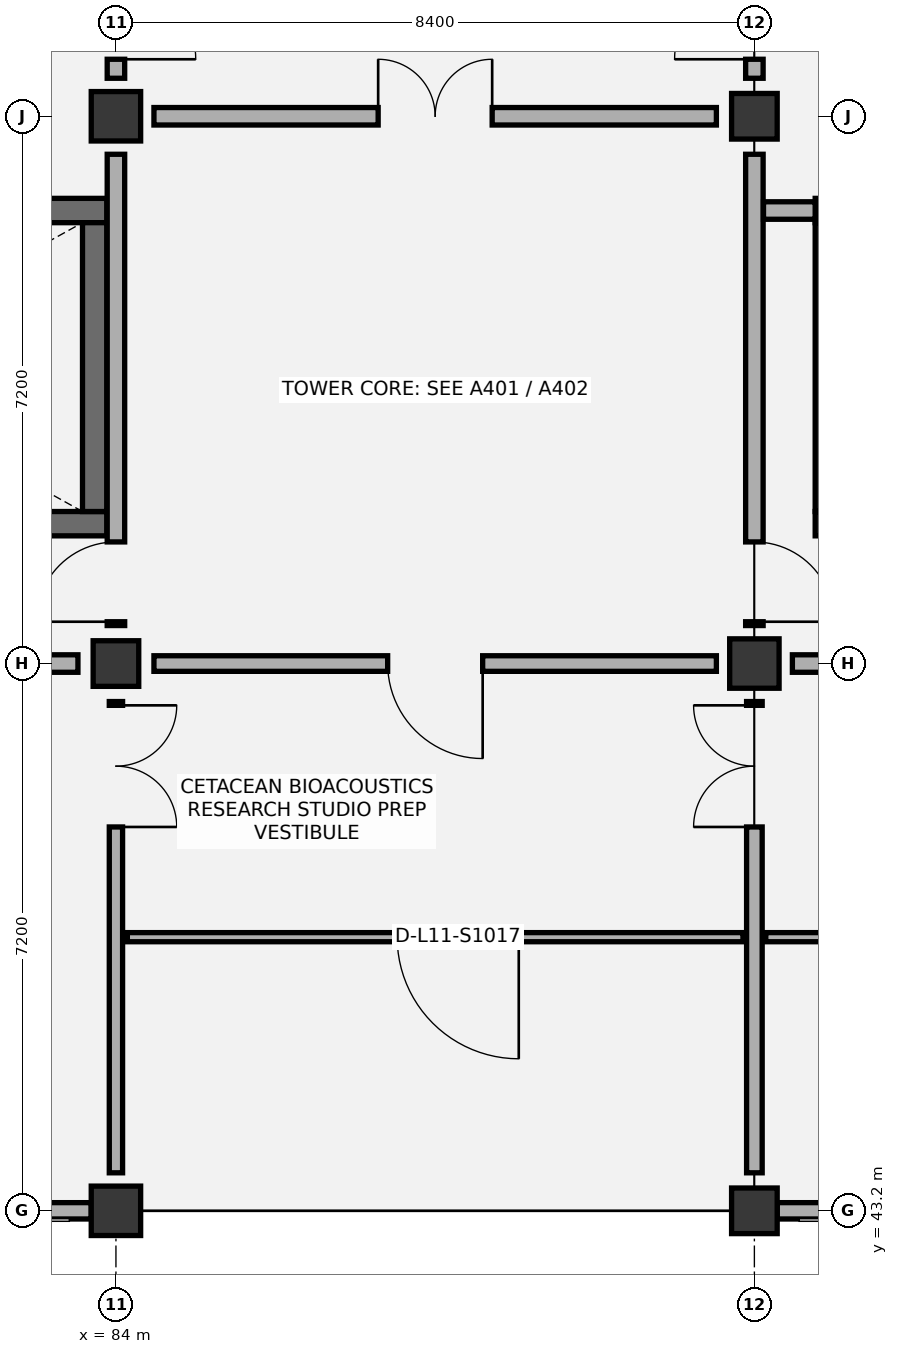
"""IFC4 building model, lengths in metres.
Left out: names, types, materials, properties, quantities, classifications, styles, units other than length and angle.
Written with IfcOpenShell. Run it as: python <this file> out.ifc"""

import sys

from ifc_helpers import new_model, si_unit, direction, frame, frame_2d, origin, origin_2d, place, context, subcontext, project, spatial, rectangle, extrude, element, fill, save


model = new_model("IFC4")
c1 = context("Model", 3, precision=1e-05, world=origin(), true_north=direction((0.0, 1.0)))
c2 = subcontext(c1, "Body", "Model", "MODEL_VIEW")
j1 = project(units=[si_unit("LENGTHUNIT", "METRE"), si_unit("PLANEANGLEUNIT", "RADIAN")], contexts=[c1])
p1 = place(None, origin())
s1 = spatial("IfcSite", under=j1, at=p1, CompositionType="ELEMENT")
p2 = place(p1, origin())
s2 = spatial("IfcBuilding", under=s1, at=p2, CompositionType="ELEMENT")
p3 = place(p2, frame((0.0, 0.0, 52.2)))
s3 = spatial("IfcBuildingStorey", under=s2, at=p3, CompositionType="ELEMENT", Elevation=52.2)
p4 = place(p3, frame((84.0, 43.2, 0.0), z_axis=(0.0, 0.0, 1.0), x_axis=(1.0, 0.0, 0.0)))
e1 = element("IfcColumn", 1, at=p4, inside=s3, PredefinedType="COLUMN", context=c2, shape_type="SweptSolid", body=[
    extrude(rectangle(XDim=0.65, YDim=0.65, at=origin_2d()), origin(), (0.0, 0.0, 1.0), 4.2),
])
p5 = place(p3, frame((84.0, 50.4, 0.0), z_axis=(0.0, 0.0, 1.0), x_axis=(1.0, 0.0, 0.0)))
e2 = element("IfcColumn", 2, at=p5, inside=s3, PredefinedType="COLUMN", context=c2, shape_type="SweptSolid", body=[
    extrude(rectangle(XDim=0.6, YDim=0.6, at=origin_2d()), origin(), (0.0, 0.0, 1.0), 4.2),
])
p6 = place(p3, frame((84.0, 57.6, 0.0), z_axis=(0.0, 0.0, 1.0), x_axis=(1.0, 0.0, 0.0)))
e3 = element("IfcColumn", 3, at=p6, inside=s3, PredefinedType="COLUMN", context=c2, shape_type="SweptSolid", body=[
    extrude(rectangle(XDim=0.65, YDim=0.65, at=origin_2d()), origin(), (0.0, 0.0, 1.0), 4.2),
])
p7 = place(p3, frame((92.4, 43.2, 0.0), z_axis=(0.0, 0.0, 1.0), x_axis=(1.0, 0.0, 0.0)))
e4 = element("IfcColumn", 4, at=p7, inside=s3, PredefinedType="COLUMN", context=c2, shape_type="SweptSolid", body=[
    extrude(rectangle(XDim=0.6, YDim=0.6, at=origin_2d()), origin(), (0.0, 0.0, 1.0), 4.2),
])
p8 = place(p3, frame((92.4, 50.4, 0.0), z_axis=(0.0, 0.0, 1.0), x_axis=(1.0, 0.0, 0.0)))
e5 = element("IfcColumn", 5, at=p8, inside=s3, PredefinedType="COLUMN", context=c2, shape_type="SweptSolid", body=[
    extrude(rectangle(XDim=0.65, YDim=0.65, at=origin_2d()), origin(), (0.0, 0.0, 1.0), 4.2),
])
p9 = place(p3, frame((92.4, 57.6, 0.0), z_axis=(0.0, 0.0, 1.0), x_axis=(1.0, 0.0, 0.0)))
e6 = element("IfcColumn", 6, at=p9, inside=s3, PredefinedType="COLUMN", context=c2, shape_type="SweptSolid", body=[
    extrude(rectangle(XDim=0.6, YDim=0.6, at=origin_2d()), origin(), (0.0, 0.0, 1.0), 4.2),
])
p10 = place(p3, frame((76.4, 52.24, 0.0), z_axis=(0.0, 0.0, 1.0), x_axis=(1.0, 0.0, 0.0)))
e7 = element("IfcWall", 7, at=p10, inside=s3, PredefinedType="SHEAR", context=c2, shape_type="SweptSolid", body=[
    extrude(rectangle(XDim=7.48, YDim=0.32, at=frame_2d((3.74, 0.0))), origin(), (0.0, 0.0, 1.0), 3.92),
])
p11 = place(p10, frame((0.45, 0.0, 0.0)))
e8 = element("IfcOpeningElement", 8, at=p11, cuts=e7, PredefinedType="OPENING", context=c2, shape_type="SweptSolid", body=[
    extrude(rectangle(XDim=1.05, YDim=2.15, at=frame_2d((0.525, 1.075))), frame((0.0, 0.17, 0.0), z_axis=(0.0, -1.0, 0.0), x_axis=(1.0, 0.0, 0.0)), (0.0, 0.0, 1.0), 0.34),
])
p12 = place(p3, frame((76.4, 56.36, 0.0), z_axis=(0.0, 0.0, 1.0), x_axis=(1.0, 0.0, 0.0)))
e9 = element("IfcWall", 9, at=p12, inside=s3, PredefinedType="SHEAR", context=c2, shape_type="SweptSolid", body=[
    extrude(rectangle(XDim=7.48, YDim=0.32, at=frame_2d((3.74, 0.0))), origin(), (0.0, 0.0, 1.0), 3.92),
])
p13 = place(p3, frame((83.72, 52.4, 0.0), z_axis=(0.0, 0.0, 1.0), x_axis=(0.0, 1.0, 0.0)))
e10 = element("IfcWall", 10, at=p13, inside=s3, PredefinedType="SHEAR", context=c2, shape_type="SweptSolid", body=[
    extrude(rectangle(XDim=3.8, YDim=0.32, at=frame_2d((1.9, 0.0))), origin(), (0.0, 0.0, 1.0), 3.92),
])
p14 = place(p3, frame((93.2, 52.24, 0.0), z_axis=(0.0, 0.0, 1.0), x_axis=(1.0, 0.0, 0.0)))
e11 = element("IfcWall", 11, at=p14, inside=s3, PredefinedType="SHEAR", context=c2, shape_type="SweptSolid", body=[
    extrude(rectangle(XDim=7.48, YDim=0.32, at=frame_2d((3.74, 0.0))), origin(), (0.0, 0.0, 1.0), 3.92),
])
p15 = place(p14, frame((0.45, 0.0, 0.0)))
e12 = element("IfcOpeningElement", 12, at=p15, cuts=e11, PredefinedType="OPENING", context=c2, shape_type="SweptSolid", body=[
    extrude(rectangle(XDim=1.05, YDim=2.15, at=frame_2d((0.525, 1.075))), frame((0.0, 0.17, 0.0), z_axis=(0.0, -1.0, 0.0), x_axis=(1.0, 0.0, 0.0)), (0.0, 0.0, 1.0), 0.34),
])
p16 = place(p3, frame((93.2, 56.36, 0.0), z_axis=(0.0, 0.0, 1.0), x_axis=(1.0, 0.0, 0.0)))
e13 = element("IfcWall", 13, at=p16, inside=s3, PredefinedType="SHEAR", context=c2, shape_type="SweptSolid", body=[
    extrude(rectangle(XDim=7.48, YDim=0.32, at=frame_2d((3.74, 0.0))), origin(), (0.0, 0.0, 1.0), 3.92),
])
p17 = place(p3, frame((93.36, 52.4, 0.0), z_axis=(0.0, 0.0, 1.0), x_axis=(0.0, 1.0, 0.0)))
e14 = element("IfcWall", 14, at=p17, inside=s3, PredefinedType="SHEAR", context=c2, shape_type="SweptSolid", body=[
    extrude(rectangle(XDim=3.8, YDim=0.32, at=frame_2d((1.9, 0.0))), origin(), (0.0, 0.0, 1.0), 3.92),
])
p18 = place(p3, frame((75.9, 43.2, 0.0), z_axis=(0.0, 0.0, 1.0), x_axis=(1.0, 0.0, 0.0)))
e15 = element("IfcWall", 15, at=p18, inside=s3, PredefinedType="SOLIDWALL", context=c2, shape_type="SweptSolid", body=[
    extrude(rectangle(XDim=7.775, YDim=0.215, at=frame_2d((3.888, 0.0))), origin(), (0.0, 0.0, 1.0), 3.365),
])
p19 = place(p18, frame((0.992, 0.0, 0.95)))
e16 = element("IfcOpeningElement", 16, at=p19, cuts=e15, PredefinedType="OPENING", context=c2, shape_type="SweptSolid", body=[
    extrude(rectangle(XDim=2.4, YDim=1.5, at=frame_2d((1.2, 0.75))), frame((0.0, 0.117, 0.0), z_axis=(0.0, -1.0, 0.0), x_axis=(1.0, 0.0, 0.0)), (0.0, 0.0, 1.0), 0.235),
])
p20 = place(p18, frame((4.383, 0.0, 0.95)))
e17 = element("IfcOpeningElement", 17, at=p20, cuts=e15, PredefinedType="OPENING", context=c2, shape_type="SweptSolid", body=[
    extrude(rectangle(XDim=2.4, YDim=1.5, at=frame_2d((1.2, 0.75))), frame((0.0, 0.117, 0.0), z_axis=(0.0, -1.0, 0.0), x_axis=(1.0, 0.0, 0.0)), (0.0, 0.0, 1.0), 0.235),
])
p21 = place(p3, frame((92.7, 43.2, 0.0), z_axis=(0.0, 0.0, 1.0), x_axis=(1.0, 0.0, 0.0)))
e18 = element("IfcWall", 18, at=p21, inside=s3, PredefinedType="SOLIDWALL", context=c2, shape_type="SweptSolid", body=[
    extrude(rectangle(XDim=7.775, YDim=0.215, at=frame_2d((3.888, 0.0))), origin(), (0.0, 0.0, 1.0), 3.365),
])
p22 = place(p21, frame((2.538, 0.0, 0.95)))
e19 = element("IfcOpeningElement", 19, at=p22, cuts=e18, PredefinedType="OPENING", context=c2, shape_type="SweptSolid", body=[
    extrude(rectangle(XDim=2.7, YDim=1.65, at=frame_2d((1.35, 0.825))), frame((0.0, 0.117, 0.0), z_axis=(0.0, -1.0, 0.0), x_axis=(1.0, 0.0, 0.0)), (0.0, 0.0, 1.0), 0.235),
])
p23 = place(p3, frame((84.15, 46.8, 0.0), z_axis=(0.0, 0.0, 1.0), x_axis=(1.0, 0.0, 0.0)))
e20 = element("IfcWall", 20, at=p23, inside=s3, PredefinedType="PARTITIONING", context=c2, shape_type="SweptSolid", body=[
    extrude(rectangle(XDim=8.1, YDim=0.12, at=frame_2d((4.05, 0.0))), origin(), (0.0, 0.0, 1.0), 3.92),
])
p24 = place(p23, frame((3.55, 0.0, 0.0)))
e21 = element("IfcOpeningElement", 21, at=p24, cuts=e20, PredefinedType="OPENING", context=c2, shape_type="SweptSolid", body=[
    extrude(rectangle(XDim=1.6, YDim=2.2, at=frame_2d((0.8, 1.1))), frame((0.0, 0.07, 0.0), z_axis=(0.0, -1.0, 0.0), x_axis=(1.0, 0.0, 0.0)), (0.0, 0.0, 1.0), 0.14),
])
p25 = place(p3, frame((92.55, 46.8, 0.0), z_axis=(0.0, 0.0, 1.0), x_axis=(1.0, 0.0, 0.0)))
e22 = element("IfcWall", 22, at=p25, inside=s3, PredefinedType="PARTITIONING", context=c2, shape_type="SweptSolid", body=[
    extrude(rectangle(XDim=8.1, YDim=0.12, at=frame_2d((4.05, 0.0))), origin(), (0.0, 0.0, 1.0), 3.92),
])
p26 = place(p25, frame((3.55, 0.0, 0.0)))
e23 = element("IfcOpeningElement", 23, at=p26, cuts=e22, PredefinedType="OPENING", context=c2, shape_type="SweptSolid", body=[
    extrude(rectangle(XDim=1.6, YDim=2.2, at=frame_2d((0.8, 1.1))), frame((0.0, 0.07, 0.0), z_axis=(0.0, -1.0, 0.0), x_axis=(1.0, 0.0, 0.0)), (0.0, 0.0, 1.0), 0.14),
])
p27 = place(p3, frame((84.0, 43.7, 0.0), z_axis=(0.0, 0.0, 1.0), x_axis=(0.0, 1.0, 0.0)))
e24 = element("IfcWall", 24, at=p27, inside=s3, PredefinedType="PARTITIONING", context=c2, shape_type="SweptSolid", body=[
    extrude(rectangle(XDim=6.2, YDim=0.175, at=frame_2d((3.1, 0.0))), origin(), (0.0, 0.0, 1.0), 3.415),
])
p28 = place(p27, frame((4.55, 0.0, 0.0)))
e25 = element("IfcOpeningElement", 25, at=p28, cuts=e24, PredefinedType="OPENING", context=c2, shape_type="SweptSolid", body=[
    extrude(rectangle(XDim=1.6, YDim=2.2, at=frame_2d((0.8, 1.1))), frame((0.0, 0.097, 0.0), z_axis=(0.0, -1.0, 0.0), x_axis=(1.0, 0.0, 0.0)), (0.0, 0.0, 1.0), 0.195),
])
p29 = place(p3, frame((76.1, 50.4, 0.0), z_axis=(0.0, 0.0, 1.0), x_axis=(1.0, 0.0, 0.0)))
e26 = element("IfcWall", 26, at=p29, inside=s3, PredefinedType="PARTITIONING", context=c2, shape_type="SweptSolid", body=[
    extrude(rectangle(XDim=7.4, YDim=0.23, at=frame_2d((3.7, 0.0))), origin(), (0.0, 0.0, 1.0), 3.415),
])
p30 = place(p29, frame((2.95, 0.0, 0.0)))
e27 = element("IfcOpeningElement", 27, at=p30, cuts=e26, PredefinedType="OPENING", context=c2, shape_type="SweptSolid", body=[
    extrude(rectangle(XDim=1.5, YDim=2.15, at=frame_2d((0.75, 1.075))), frame((0.0, 0.125, 0.0), z_axis=(0.0, -1.0, 0.0), x_axis=(1.0, 0.0, 0.0)), (0.0, 0.0, 1.0), 0.25),
])
p31 = place(p3, frame((84.0, 50.9, 0.0), z_axis=(0.0, 0.0, 1.0), x_axis=(0.0, 1.0, 0.0)))
e28 = element("IfcWall", 28, at=p31, inside=s3, PredefinedType="PARTITIONING", context=c2, shape_type="SweptSolid", body=[
    extrude(rectangle(XDim=6.2, YDim=0.23, at=frame_2d((3.1, 0.0))), origin(), (0.0, 0.0, 1.0), 3.415),
])
p32 = place(p31, frame((0.05, 0.0, 0.0)))
e29 = element("IfcOpeningElement", 29, at=p32, cuts=e28, PredefinedType="OPENING", context=c2, shape_type="SweptSolid", body=[
    extrude(rectangle(XDim=1.05, YDim=2.15, at=frame_2d((0.525, 1.075))), frame((0.0, 0.125, 0.0), z_axis=(0.0, -1.0, 0.0), x_axis=(1.0, 0.0, 0.0)), (0.0, 0.0, 1.0), 0.25),
])
p33 = place(p3, frame((84.0, 58.1, 0.0), z_axis=(0.0, 0.0, 1.0), x_axis=(0.0, 1.0, 0.0)))
e30 = element("IfcWall", 30, at=p33, inside=s3, PredefinedType="PARTITIONING", context=c2, shape_type="SweptSolid", body=[
    extrude(rectangle(XDim=6.2, YDim=0.23, at=frame_2d((3.1, 0.0))), origin(), (0.0, 0.0, 1.0), 3.415),
])
p34 = place(p33, frame((0.25, 0.0, 0.0)))
e31 = element("IfcOpeningElement", 31, at=p34, cuts=e30, PredefinedType="OPENING", context=c2, shape_type="SweptSolid", body=[
    extrude(rectangle(XDim=1.05, YDim=2.15, at=frame_2d((0.525, 1.075))), frame((0.0, 0.125, 0.0), z_axis=(0.0, -1.0, 0.0), x_axis=(1.0, 0.0, 0.0)), (0.0, 0.0, 1.0), 0.25),
])
p35 = place(p3, frame((92.4, 43.7, 0.0), z_axis=(0.0, 0.0, 1.0), x_axis=(0.0, 1.0, 0.0)))
e32 = element("IfcWall", 32, at=p35, inside=s3, PredefinedType="PARTITIONING", context=c2, shape_type="SweptSolid", body=[
    extrude(rectangle(XDim=6.2, YDim=0.205, at=frame_2d((3.1, 0.0))), origin(), (0.0, 0.0, 1.0), 3.415),
])
p36 = place(p35, frame((4.55, 0.0, 0.0)))
e33 = element("IfcOpeningElement", 33, at=p36, cuts=e32, PredefinedType="OPENING", context=c2, shape_type="SweptSolid", body=[
    extrude(rectangle(XDim=1.6, YDim=2.2, at=frame_2d((0.8, 1.1))), frame((0.0, 0.113, 0.0), z_axis=(0.0, -1.0, 0.0), x_axis=(1.0, 0.0, 0.0)), (0.0, 0.0, 1.0), 0.225),
])
p37 = place(p3, frame((84.5, 50.4, 0.0), z_axis=(0.0, 0.0, 1.0), x_axis=(1.0, 0.0, 0.0)))
e34 = element("IfcWall", 34, at=p37, inside=s3, PredefinedType="PARTITIONING", context=c2, shape_type="SweptSolid", body=[
    extrude(rectangle(XDim=7.4, YDim=0.205, at=frame_2d((3.7, 0.0))), origin(), (0.0, 0.0, 1.0), 3.465),
])
p38 = place(p37, frame((3.075, 0.0, 0.0)))
e35 = element("IfcOpeningElement", 35, at=p38, cuts=e34, PredefinedType="OPENING", context=c2, shape_type="SweptSolid", body=[
    extrude(rectangle(XDim=1.25, YDim=2.1, at=frame_2d((0.625, 1.05))), frame((0.0, 0.113, 0.0), z_axis=(0.0, -1.0, 0.0), x_axis=(1.0, 0.0, 0.0)), (0.0, 0.0, 1.0), 0.225),
])
p39 = place(p3, frame((92.4, 50.9, 0.0), z_axis=(0.0, 0.0, 1.0), x_axis=(0.0, 1.0, 0.0)))
e36 = element("IfcWall", 36, at=p39, inside=s3, PredefinedType="PARTITIONING", context=c2, shape_type="SweptSolid", body=[
    extrude(rectangle(XDim=6.2, YDim=0.23, at=frame_2d((3.1, 0.0))), origin(), (0.0, 0.0, 1.0), 3.415),
])
p40 = place(p39, frame((0.05, 0.0, 0.0)))
e37 = element("IfcOpeningElement", 37, at=p40, cuts=e36, PredefinedType="OPENING", context=c2, shape_type="SweptSolid", body=[
    extrude(rectangle(XDim=1.05, YDim=2.15, at=frame_2d((0.525, 1.075))), frame((0.0, 0.125, 0.0), z_axis=(0.0, -1.0, 0.0), x_axis=(1.0, 0.0, 0.0)), (0.0, 0.0, 1.0), 0.25),
])
p41 = place(p3, frame((84.5, 57.6, 0.0), z_axis=(0.0, 0.0, 1.0), x_axis=(1.0, 0.0, 0.0)))
e38 = element("IfcWall", 38, at=p41, inside=s3, PredefinedType="PARTITIONING", context=c2, shape_type="SweptSolid", body=[
    extrude(rectangle(XDim=7.4, YDim=0.23, at=frame_2d((3.7, 0.0))), origin(), (0.0, 0.0, 1.0), 3.465),
])
p42 = place(p41, frame((2.95, 0.0, 0.0)))
e39 = element("IfcOpeningElement", 39, at=p42, cuts=e38, PredefinedType="OPENING", context=c2, shape_type="SweptSolid", body=[
    extrude(rectangle(XDim=1.5, YDim=2.15, at=frame_2d((0.75, 1.075))), frame((0.0, 0.125, 0.0), z_axis=(0.0, -1.0, 0.0), x_axis=(1.0, 0.0, 0.0)), (0.0, 0.0, 1.0), 0.25),
])
p43 = place(p3, frame((92.4, 58.1, 0.0), z_axis=(0.0, 0.0, 1.0), x_axis=(0.0, 1.0, 0.0)))
e40 = element("IfcWall", 40, at=p43, inside=s3, PredefinedType="PARTITIONING", context=c2, shape_type="SweptSolid", body=[
    extrude(rectangle(XDim=6.2, YDim=0.23, at=frame_2d((3.1, 0.0))), origin(), (0.0, 0.0, 1.0), 3.515),
])
p44 = place(p43, frame((0.25, 0.0, 0.0)))
e41 = element("IfcOpeningElement", 41, at=p44, cuts=e40, PredefinedType="OPENING", context=c2, shape_type="SweptSolid", body=[
    extrude(rectangle(XDim=1.05, YDim=2.15, at=frame_2d((0.525, 1.075))), frame((0.0, 0.125, 0.0), z_axis=(0.0, -1.0, 0.0), x_axis=(1.0, 0.0, 0.0)), (0.0, 0.0, 1.0), 0.25),
])
p45 = place(p3, frame((92.9, 50.4, 0.0), z_axis=(0.0, 0.0, 1.0), x_axis=(1.0, 0.0, 0.0)))
e42 = element("IfcWall", 42, at=p45, inside=s3, PredefinedType="PARTITIONING", context=c2, shape_type="SweptSolid", body=[
    extrude(rectangle(XDim=7.4, YDim=0.23, at=frame_2d((3.7, 0.0))), origin(), (0.0, 0.0, 1.0), 3.515),
])
p46 = place(p45, frame((2.95, 0.0, 0.0)))
e43 = element("IfcOpeningElement", 43, at=p46, cuts=e42, PredefinedType="OPENING", context=c2, shape_type="SweptSolid", body=[
    extrude(rectangle(XDim=1.5, YDim=2.15, at=frame_2d((0.75, 1.075))), frame((0.0, 0.125, 0.0), z_axis=(0.0, -1.0, 0.0), x_axis=(1.0, 0.0, 0.0)), (0.0, 0.0, 1.0), 0.25),
])
p47 = place(p3, frame((92.52, 56.36, 0.0), z_axis=(0.0, 0.0, 1.0), x_axis=(1.0, 0.0, 0.0)))
e44 = element("IfcWall", 44, at=p47, inside=s3, PredefinedType="PARTITIONING", context=c2, shape_type="SweptSolid", body=[
    extrude(rectangle(XDim=0.68, YDim=0.23, at=frame_2d((0.34, 0.0))), origin(), (0.0, 0.0, 1.0), 3.92),
])
p48 = place(p24, frame((1.6, 0.0, 0.0), z_axis=(0.0, 0.0, 1.0), x_axis=(-1.0, 0.0, 0.0)))
e45 = element("IfcDoor", 45, at=p48, inside=s3, OperationType="SINGLE_SWING_LEFT", PredefinedType="DOOR", context=c2, shape_type="SweptSolid", body=[
    extrude(rectangle(XDim=1.6, YDim=2.2, at=frame_2d((0.8, 1.1))), frame((0.0, 0.025, 0.0), z_axis=(0.0, -1.0, 0.0), x_axis=(1.0, 0.0, 0.0)), (0.0, 0.0, 1.0), 0.05),
])
fill(e21, e45)
p49 = place(p28, frame((1.6, 0.0, 0.0), z_axis=(0.0, 0.0, 1.0), x_axis=(-1.0, 0.0, 0.0)))
e46 = element("IfcDoor", 46, at=p49, inside=s3, OperationType="DOUBLE_DOOR_SINGLE_SWING", PredefinedType="DOOR", context=c2, shape_type="SweptSolid", body=[
    extrude(rectangle(XDim=1.6, YDim=2.2, at=frame_2d((0.8, 1.1))), frame((0.0, 0.025, 0.0), z_axis=(0.0, -1.0, 0.0), x_axis=(1.0, 0.0, 0.0)), (0.0, 0.0, 1.0), 0.05),
])
fill(e25, e46)
p50 = place(p32, origin())
e47 = element("IfcDoor", 47, at=p50, inside=s3, OperationType="SINGLE_SWING_LEFT", PredefinedType="DOOR", context=c2, shape_type="SweptSolid", body=[
    extrude(rectangle(XDim=1.05, YDim=2.15, at=frame_2d((0.525, 1.075))), frame((0.0, 0.025, 0.0), z_axis=(0.0, -1.0, 0.0), x_axis=(1.0, 0.0, 0.0)), (0.0, 0.0, 1.0), 0.05),
])
fill(e29, e47)
p51 = place(p34, frame((1.05, 0.0, 0.0), z_axis=(0.0, 0.0, 1.0), x_axis=(-1.0, 0.0, 0.0)))
e48 = element("IfcDoor", 48, at=p51, inside=s3, OperationType="SINGLE_SWING_RIGHT", PredefinedType="DOOR", context=c2, shape_type="SweptSolid", body=[
    extrude(rectangle(XDim=1.05, YDim=2.15, at=frame_2d((0.525, 1.075))), frame((0.0, 0.025, 0.0), z_axis=(0.0, -1.0, 0.0), x_axis=(1.0, 0.0, 0.0)), (0.0, 0.0, 1.0), 0.05),
])
fill(e31, e48)
p52 = place(p36, origin())
e49 = element("IfcDoor", 49, at=p52, inside=s3, OperationType="DOUBLE_DOOR_SINGLE_SWING", PredefinedType="DOOR", context=c2, shape_type="SweptSolid", body=[
    extrude(rectangle(XDim=1.6, YDim=2.2, at=frame_2d((0.8, 1.1))), frame((0.0, 0.025, 0.0), z_axis=(0.0, -1.0, 0.0), x_axis=(1.0, 0.0, 0.0)), (0.0, 0.0, 1.0), 0.05),
])
fill(e33, e49)
p53 = place(p38, frame((1.25, 0.0, 0.0), z_axis=(0.0, 0.0, 1.0), x_axis=(-1.0, 0.0, 0.0)))
e50 = element("IfcDoor", 50, at=p53, inside=s3, OperationType="SINGLE_SWING_LEFT", PredefinedType="DOOR", context=c2, shape_type="SweptSolid", body=[
    extrude(rectangle(XDim=1.25, YDim=2.1, at=frame_2d((0.625, 1.05))), frame((0.0, 0.025, 0.0), z_axis=(0.0, -1.0, 0.0), x_axis=(1.0, 0.0, 0.0)), (0.0, 0.0, 1.0), 0.05),
])
fill(e35, e50)
p54 = place(p40, frame((1.05, 0.0, 0.0), z_axis=(0.0, 0.0, 1.0), x_axis=(-1.0, 0.0, 0.0)))
e51 = element("IfcDoor", 51, at=p54, inside=s3, OperationType="SINGLE_SWING_RIGHT", PredefinedType="DOOR", context=c2, shape_type="SweptSolid", body=[
    extrude(rectangle(XDim=1.05, YDim=2.15, at=frame_2d((0.525, 1.075))), frame((0.0, 0.025, 0.0), z_axis=(0.0, -1.0, 0.0), x_axis=(1.0, 0.0, 0.0)), (0.0, 0.0, 1.0), 0.05),
])
fill(e37, e51)
p55 = place(p42, origin())
e52 = element("IfcDoor", 52, at=p55, inside=s3, OperationType="DOUBLE_DOOR_SINGLE_SWING", PredefinedType="DOOR", context=c2, shape_type="SweptSolid", body=[
    extrude(rectangle(XDim=1.5, YDim=2.15, at=frame_2d((0.75, 1.075))), frame((0.0, 0.025, 0.0), z_axis=(0.0, -1.0, 0.0), x_axis=(1.0, 0.0, 0.0)), (0.0, 0.0, 1.0), 0.05),
])
fill(e39, e52)
p56 = place(p44, origin())
e53 = element("IfcDoor", 53, at=p56, inside=s3, OperationType="SINGLE_SWING_LEFT", PredefinedType="DOOR", context=c2, shape_type="SweptSolid", body=[
    extrude(rectangle(XDim=1.05, YDim=2.15, at=frame_2d((0.525, 1.075))), frame((0.0, 0.025, 0.0), z_axis=(0.0, -1.0, 0.0), x_axis=(1.0, 0.0, 0.0)), (0.0, 0.0, 1.0), 0.05),
])
fill(e41, e53)
save(model, sys.argv[1])
